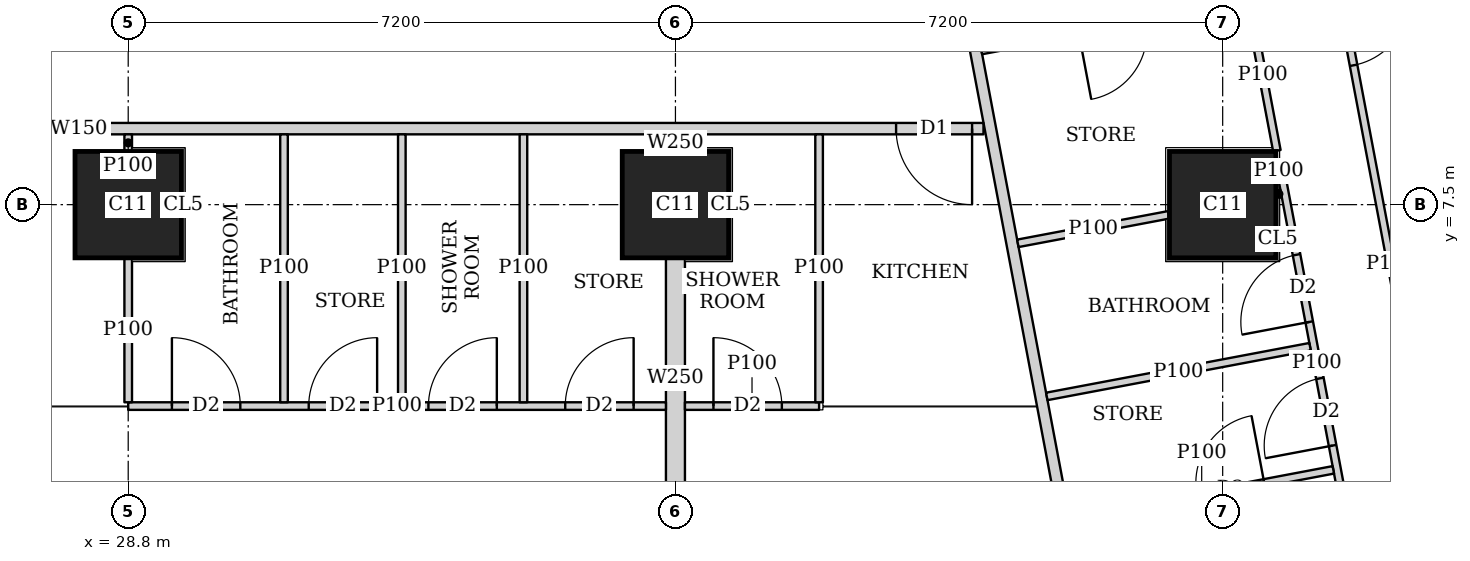
"""IFC4 building model, lengths in metres.
Left out: names, types, materials, properties, quantities, classifications, styles, units other than length and angle.
Written with IfcOpenShell. Run it as: python <this file> out.ifc"""

import sys

from ifc_helpers import new_model, si_unit, direction, frame, frame_2d, origin, origin_2d, place, context, subcontext, project, spatial, rectangle, extrude, element, fill, save


model = new_model("IFC4")
c1 = context("Model", 3, precision=1e-05, world=origin(), true_north=direction((0.0, 1.0)))
c2 = subcontext(c1, "Body", "Model", "MODEL_VIEW")
j1 = project(units=[si_unit("LENGTHUNIT", "METRE"), si_unit("PLANEANGLEUNIT", "RADIAN")], contexts=[c1])
p1 = place(None, origin())
s1 = spatial("IfcSite", under=j1, at=p1, CompositionType="ELEMENT")
p2 = place(p1, origin())
s2 = spatial("IfcBuilding", under=s1, at=p2, CompositionType="ELEMENT")
p3 = place(p2, frame((0.0, 0.0, 227.45)))
s3 = spatial("IfcBuildingStorey", under=s2, at=p3, CompositionType="ELEMENT", Elevation=227.45)
for number, where, z_axis, x_axis in (
    (1, (28.8, 7.5, 0.0), (0.0, 0.0, 1.0), (1.0, 0.0, 0.0)),
    (2, (36.0, 7.5, 0.0), (0.0, 0.0, 1.0), (1.0, 0.0, 0.0)),
    (3, (43.2, 7.5, 0.0), (0.0, 0.0, 1.0), (1.0, 0.0, 0.0)),
):
    element("IfcColumn", number, at=place(p3, frame(where, z_axis=z_axis, x_axis=x_axis)), inside=s3, PredefinedType="COLUMN", context=c2, shape_type="SweptSolid", body=[
        extrude(rectangle(XDim=1.4, YDim=1.4, at=origin_2d()), origin(), (0.0, 0.0, 1.0), 3.75),
    ])
p4 = place(p3, frame((50.653, 2.703, 0.0), z_axis=(0.0, 0.0, 1.0), x_axis=(-0.185612026696, 0.982623109613, 0.0)))
e4 = element("IfcWall", 4, at=p4, inside=s3, PredefinedType="SOLIDWALL", context=c2, shape_type="SweptSolid", body=[
    extrude(rectangle(XDim=41.393, YDim=0.2, at=frame_2d((20.697, 0.0))), origin(), (0.0, 0.0, 1.0), 3.5),
])
p5 = place(p4, frame((1.633, 0.0, 0.9)))
e5 = element("IfcOpeningElement", 5, at=p5, cuts=e4, PredefinedType="OPENING", context=c2, shape_type="SweptSolid", body=[
    extrude(rectangle(XDim=1.8, YDim=1.5, at=frame_2d((0.9, 0.75))), frame((0.0, 0.11, 0.0), z_axis=(0.0, -1.0, 0.0), x_axis=(1.0, 0.0, 0.0)), (0.0, 0.0, 1.0), 0.22),
])
p6 = place(p4, frame((6.032, 0.0, 0.9)))
e6 = element("IfcOpeningElement", 6, at=p6, cuts=e4, PredefinedType="OPENING", context=c2, shape_type="SweptSolid", body=[
    extrude(rectangle(XDim=1.8, YDim=1.5, at=frame_2d((0.9, 0.75))), frame((0.0, 0.11, 0.0), z_axis=(0.0, -1.0, 0.0), x_axis=(1.0, 0.0, 0.0)), (0.0, 0.0, 1.0), 0.22),
])
p7 = place(p4, frame((9.848, 0.0, 0.9)))
e7 = element("IfcOpeningElement", 7, at=p7, cuts=e4, PredefinedType="OPENING", context=c2, shape_type="SweptSolid", body=[
    extrude(rectangle(XDim=1.8, YDim=1.5, at=frame_2d((0.9, 0.75))), frame((0.0, 0.11, 0.0), z_axis=(0.0, -1.0, 0.0), x_axis=(1.0, 0.0, 0.0)), (0.0, 0.0, 1.0), 0.22),
])
p8 = place(p4, frame((13.664, 0.0, 0.9)))
e8 = element("IfcOpeningElement", 8, at=p8, cuts=e4, PredefinedType="OPENING", context=c2, shape_type="SweptSolid", body=[
    extrude(rectangle(XDim=1.8, YDim=1.5, at=frame_2d((0.9, 0.75))), frame((0.0, 0.11, 0.0), z_axis=(0.0, -1.0, 0.0), x_axis=(1.0, 0.0, 0.0)), (0.0, 0.0, 1.0), 0.22),
])
p9 = place(p4, frame((17.481, 0.0, 0.9)))
e9 = element("IfcOpeningElement", 9, at=p9, cuts=e4, PredefinedType="OPENING", context=c2, shape_type="SweptSolid", body=[
    extrude(rectangle(XDim=1.8, YDim=1.5, at=frame_2d((0.9, 0.75))), frame((0.0, 0.11, 0.0), z_axis=(0.0, -1.0, 0.0), x_axis=(1.0, 0.0, 0.0)), (0.0, 0.0, 1.0), 0.22),
])
p10 = place(p4, frame((21.297, 0.0, 0.9)))
e10 = element("IfcOpeningElement", 10, at=p10, cuts=e4, PredefinedType="OPENING", context=c2, shape_type="SweptSolid", body=[
    extrude(rectangle(XDim=1.8, YDim=1.5, at=frame_2d((0.9, 0.75))), frame((0.0, 0.11, 0.0), z_axis=(0.0, -1.0, 0.0), x_axis=(1.0, 0.0, 0.0)), (0.0, 0.0, 1.0), 0.22),
])
p11 = place(p4, frame((25.113, 0.0, 0.9)))
e11 = element("IfcOpeningElement", 11, at=p11, cuts=e4, PredefinedType="OPENING", context=c2, shape_type="SweptSolid", body=[
    extrude(rectangle(XDim=1.8, YDim=1.5, at=frame_2d((0.9, 0.75))), frame((0.0, 0.11, 0.0), z_axis=(0.0, -1.0, 0.0), x_axis=(1.0, 0.0, 0.0)), (0.0, 0.0, 1.0), 0.22),
])
p12 = place(p4, frame((28.93, 0.0, 0.9)))
e12 = element("IfcOpeningElement", 12, at=p12, cuts=e4, PredefinedType="OPENING", context=c2, shape_type="SweptSolid", body=[
    extrude(rectangle(XDim=1.8, YDim=1.5, at=frame_2d((0.9, 0.75))), frame((0.0, 0.11, 0.0), z_axis=(0.0, -1.0, 0.0), x_axis=(1.0, 0.0, 0.0)), (0.0, 0.0, 1.0), 0.22),
])
p13 = place(p4, frame((32.746, 0.0, 0.9)))
e13 = element("IfcOpeningElement", 13, at=p13, cuts=e4, PredefinedType="OPENING", context=c2, shape_type="SweptSolid", body=[
    extrude(rectangle(XDim=1.8, YDim=1.5, at=frame_2d((0.9, 0.75))), frame((0.0, 0.11, 0.0), z_axis=(0.0, -1.0, 0.0), x_axis=(1.0, 0.0, 0.0)), (0.0, 0.0, 1.0), 0.22),
])
p14 = place(p4, frame((36.481, 0.0, 0.9)))
e14 = element("IfcOpeningElement", 14, at=p14, cuts=e4, PredefinedType="OPENING", context=c2, shape_type="SweptSolid", body=[
    extrude(rectangle(XDim=1.8, YDim=1.5, at=frame_2d((0.9, 0.75))), frame((0.0, 0.11, 0.0), z_axis=(0.0, -1.0, 0.0), x_axis=(1.0, 0.0, 0.0)), (0.0, 0.0, 1.0), 0.22),
])
p15 = place(p3, frame((40.053, 8.5, 0.0), z_axis=(0.0, 0.0, 1.0), x_axis=(-1.0, 0.0, 0.0)))
e15 = element("IfcWall", 15, at=p15, inside=s3, PredefinedType="SOLIDWALL", context=c2, shape_type="SweptSolid", body=[
    extrude(rectangle(XDim=23.798, YDim=0.15, at=frame_2d((11.899, 0.0))), origin(), (0.0, 0.0, 1.0), 3.5),
])
p16 = place(p15, frame((21.978, 0.0, 0.0)))
e16 = element("IfcOpeningElement", 16, at=p16, cuts=e15, PredefinedType="OPENING", context=c2, shape_type="SweptSolid", body=[
    extrude(rectangle(XDim=1.0, YDim=2.1, at=frame_2d((0.5, 1.05))), frame((0.0, 0.085, 0.0), z_axis=(0.0, -1.0, 0.0), x_axis=(1.0, 0.0, 0.0)), (0.0, 0.0, 1.0), 0.17),
])
p17 = place(p15, frame((12.753, 0.0, 0.0)))
e17 = element("IfcOpeningElement", 17, at=p17, cuts=e15, PredefinedType="OPENING", context=c2, shape_type="SweptSolid", body=[
    extrude(rectangle(XDim=1.0, YDim=2.1, at=frame_2d((0.5, 1.05))), frame((0.0, 0.085, 0.0), z_axis=(0.0, -1.0, 0.0), x_axis=(1.0, 0.0, 0.0)), (0.0, 0.0, 1.0), 0.17),
])
p18 = place(p15, frame((0.15, 0.0, 0.0)))
e18 = element("IfcOpeningElement", 18, at=p18, cuts=e15, PredefinedType="OPENING", context=c2, shape_type="SweptSolid", body=[
    extrude(rectangle(XDim=1.0, YDim=2.1, at=frame_2d((0.5, 1.05))), frame((0.0, 0.085, 0.0), z_axis=(0.0, -1.0, 0.0), x_axis=(1.0, 0.0, 0.0)), (0.0, 0.0, 1.0), 0.17),
])
p19 = place(p3, frame((33.68, 42.723, 0.0), z_axis=(0.0, 0.0, 1.0), x_axis=(0.185601160014, -0.982625162207, 0.0)))
e19 = element("IfcWall", 19, at=p19, inside=s3, PredefinedType="SOLIDWALL", context=c2, shape_type="SweptSolid", body=[
    extrude(rectangle(XDim=41.051, YDim=0.15, at=frame_2d((20.526, 0.0))), origin(), (0.0, 0.0, 1.0), 2.5),
])
p20 = place(p19, frame((16.123, 0.0, 0.0)))
e20 = element("IfcOpeningElement", 20, at=p20, cuts=e19, PredefinedType="OPENING", context=c2, shape_type="SweptSolid", body=[
    extrude(rectangle(XDim=1.0, YDim=2.1, at=frame_2d((0.5, 1.05))), frame((0.0, 0.085, 0.0), z_axis=(0.0, -1.0, 0.0), x_axis=(1.0, 0.0, 0.0)), (0.0, 0.0, 1.0), 0.17),
])
p21 = place(p19, frame((19.938, 0.0, 0.0)))
e21 = element("IfcOpeningElement", 21, at=p21, cuts=e19, PredefinedType="OPENING", context=c2, shape_type="SweptSolid", body=[
    extrude(rectangle(XDim=1.0, YDim=2.1, at=frame_2d((0.5, 1.05))), frame((0.0, 0.085, 0.0), z_axis=(0.0, -1.0, 0.0), x_axis=(1.0, 0.0, 0.0)), (0.0, 0.0, 1.0), 0.17),
])
p22 = place(p19, frame((30.902, 0.0, 0.0)))
e22 = element("IfcOpeningElement", 22, at=p22, cuts=e19, PredefinedType="OPENING", context=c2, shape_type="SweptSolid", body=[
    extrude(rectangle(XDim=1.0, YDim=2.1, at=frame_2d((0.5, 1.05))), frame((0.0, 0.085, 0.0), z_axis=(0.0, -1.0, 0.0), x_axis=(1.0, 0.0, 0.0)), (0.0, 0.0, 1.0), 0.17),
])
p23 = place(p3, frame((35.875, 4.85, 0.0), z_axis=(0.0, 0.0, 1.0), x_axis=(-1.0, 0.0, 0.0)))
e23 = element("IfcWall", 23, at=p23, inside=s3, PredefinedType="PARTITIONING", context=c2, shape_type="SweptSolid", body=[
    extrude(rectangle(XDim=7.075, YDim=0.1, at=frame_2d((3.538, 0.0))), origin(), (0.0, 0.0, 1.0), 3.5),
])
p24 = place(p23, frame((5.6, 0.0, 0.0)))
e24 = element("IfcOpeningElement", 24, at=p24, cuts=e23, PredefinedType="OPENING", context=c2, shape_type="SweptSolid", body=[
    extrude(rectangle(XDim=0.9, YDim=2.1, at=frame_2d((0.45, 1.05))), frame((0.0, 0.06, 0.0), z_axis=(0.0, -1.0, 0.0), x_axis=(1.0, 0.0, 0.0)), (0.0, 0.0, 1.0), 0.12),
])
p25 = place(p23, frame((2.225, 0.0, 0.0)))
e25 = element("IfcOpeningElement", 25, at=p25, cuts=e23, PredefinedType="OPENING", context=c2, shape_type="SweptSolid", body=[
    extrude(rectangle(XDim=0.9, YDim=2.1, at=frame_2d((0.45, 1.05))), frame((0.0, 0.06, 0.0), z_axis=(0.0, -1.0, 0.0), x_axis=(1.0, 0.0, 0.0)), (0.0, 0.0, 1.0), 0.12),
])
p26 = place(p23, frame((3.8, 0.0, 0.0)))
e26 = element("IfcOpeningElement", 26, at=p26, cuts=e23, PredefinedType="OPENING", context=c2, shape_type="SweptSolid", body=[
    extrude(rectangle(XDim=0.9, YDim=2.1, at=frame_2d((0.45, 1.05))), frame((0.0, 0.06, 0.0), z_axis=(0.0, -1.0, 0.0), x_axis=(1.0, 0.0, 0.0)), (0.0, 0.0, 1.0), 0.12),
])
p27 = place(p23, frame((0.425, 0.0, 0.0)))
e27 = element("IfcOpeningElement", 27, at=p27, cuts=e23, PredefinedType="OPENING", context=c2, shape_type="SweptSolid", body=[
    extrude(rectangle(XDim=0.9, YDim=2.1, at=frame_2d((0.45, 1.05))), frame((0.0, 0.06, 0.0), z_axis=(0.0, -1.0, 0.0), x_axis=(1.0, 0.0, 0.0)), (0.0, 0.0, 1.0), 0.12),
])
p28 = place(p3, frame((28.8, 4.9, 0.0), z_axis=(0.0, 0.0, 1.0), x_axis=(0.0, 1.0, 0.0)))
e28 = element("IfcWall", 28, at=p28, inside=s3, PredefinedType="PARTITIONING", context=c2, shape_type="SweptSolid", body=[
    extrude(rectangle(XDim=1.899, YDim=0.1, at=frame_2d((0.95, 0.0))), origin(), (0.0, 0.0, 1.0), 3.5),
])
p29 = place(p3, frame((28.8, 8.201, 0.0), z_axis=(0.0, 0.0, 1.0), x_axis=(0.0, 1.0, 0.0)))
e29 = element("IfcWall", 29, at=p29, inside=s3, PredefinedType="PARTITIONING", context=c2, shape_type="SweptSolid", body=[
    extrude(rectangle(XDim=0.224, YDim=0.1, at=frame_2d((0.112, 0.0))), origin(), (0.0, 0.0, 1.0), 3.5),
])
for number, where, z_axis, x_axis in (
    (30, (32.4, 4.9, 0.0), (0.0, 0.0, 1.0), (0.0, 1.0, 0.0)),
    (31, (30.85, 4.9, 0.0), (0.0, 0.0, 1.0), (0.0, 1.0, 0.0)),
    (32, (34.0, 4.9, 0.0), (0.0, 0.0, 1.0), (0.0, 1.0, 0.0)),
):
    element("IfcWall", number, at=place(p3, frame(where, z_axis=z_axis, x_axis=x_axis)), inside=s3, PredefinedType="PARTITIONING", context=c2, shape_type="SweptSolid", body=[
        extrude(rectangle(XDim=3.525, YDim=0.1, at=frame_2d((1.763, 0.0))), origin(), (0.0, 0.0, 1.0), 3.5),
    ])
p30 = place(p3, frame((37.89, 4.85, 0.0), z_axis=(0.0, 0.0, 1.0), x_axis=(-1.0, 0.0, 0.0)))
e33 = element("IfcWall", 33, at=p30, inside=s3, PredefinedType="PARTITIONING", context=c2, shape_type="SweptSolid", body=[
    extrude(rectangle(XDim=1.765, YDim=0.1, at=frame_2d((0.882, 0.0))), origin(), (0.0, 0.0, 1.0), 3.5),
])
p31 = place(p30, frame((0.49, 0.0, 0.0)))
e34 = element("IfcOpeningElement", 34, at=p31, cuts=e33, PredefinedType="OPENING", context=c2, shape_type="SweptSolid", body=[
    extrude(rectangle(XDim=0.9, YDim=2.1, at=frame_2d((0.45, 1.05))), frame((0.0, 0.06, 0.0), z_axis=(0.0, -1.0, 0.0), x_axis=(1.0, 0.0, 0.0)), (0.0, 0.0, 1.0), 0.12),
])
p32 = place(p3, frame((37.89, 4.9, 0.0), z_axis=(0.0, 0.0, 1.0), x_axis=(0.0, 1.0, 0.0)))
e35 = element("IfcWall", 35, at=p32, inside=s3, PredefinedType="PARTITIONING", context=c2, shape_type="SweptSolid", body=[
    extrude(rectangle(XDim=3.525, YDim=0.1, at=frame_2d((1.763, 0.0))), origin(), (0.0, 0.0, 1.0), 3.5),
])
p33 = place(p3, frame((36.0, 3.65, 0.0), z_axis=(0.0, 0.0, 1.0), x_axis=(0.0, 1.0, 0.0)))
e36 = element("IfcWall", 36, at=p33, inside=s3, PredefinedType="SOLIDWALL", context=c2, shape_type="SweptSolid", body=[
    extrude(rectangle(XDim=3.149, YDim=0.25, at=frame_2d((1.575, 0.0))), origin(), (0.0, 0.0, 1.0), 3.5),
])
p34 = place(p3, frame((36.0, 8.201, 0.0), z_axis=(0.0, 0.0, 1.0), x_axis=(0.0, 1.0, 0.0)))
e37 = element("IfcWall", 37, at=p34, inside=s3, PredefinedType="SOLIDWALL", context=c2, shape_type="SweptSolid", body=[
    extrude(rectangle(XDim=0.224, YDim=0.25, at=frame_2d((0.112, 0.0))), origin(), (0.0, 0.0, 1.0), 3.5),
])
p35 = place(p3, frame((44.727, 10.366, 0.0), z_axis=(0.0, 0.0, 1.0), x_axis=(0.185678775129, -0.982610498858, 0.0)))
e38 = element("IfcWall", 38, at=p35, inside=s3, PredefinedType="PARTITIONING", context=c2, shape_type="SweptSolid", body=[
    extrude(rectangle(XDim=7.421, YDim=0.1, at=frame_2d((3.71, 0.0))), origin(), (0.0, 0.0, 1.0), 3.5),
])
p36 = place(p35, frame((0.151, 0.0, 0.0)))
e39 = element("IfcOpeningElement", 39, at=p36, cuts=e38, PredefinedType="OPENING", context=c2, shape_type="SweptSolid", body=[
    extrude(rectangle(XDim=0.9, YDim=2.1, at=frame_2d((0.45, 1.05))), frame((0.0, 0.06, 0.0), z_axis=(0.0, -1.0, 0.0), x_axis=(1.0, 0.0, 0.0)), (0.0, 0.0, 1.0), 0.12),
])
p37 = place(p35, frame((4.65, 0.0, 0.0)))
e40 = element("IfcOpeningElement", 40, at=p37, cuts=e38, PredefinedType="OPENING", context=c2, shape_type="SweptSolid", body=[
    extrude(rectangle(XDim=0.9, YDim=2.1, at=frame_2d((0.45, 1.05))), frame((0.0, 0.06, 0.0), z_axis=(0.0, -1.0, 0.0), x_axis=(1.0, 0.0, 0.0)), (0.0, 0.0, 1.0), 0.12),
])
p38 = place(p3, frame((43.539, 10.192, 0.0), z_axis=(0.0, 0.0, 1.0), x_axis=(0.185443145218, -0.982654995353, 0.0)))
e41 = element("IfcWall", 41, at=p38, inside=s3, PredefinedType="PARTITIONING", context=c2, shape_type="SweptSolid", body=[
    extrude(rectangle(XDim=2.017, YDim=0.1, at=frame_2d((1.008, 0.0))), origin(), (0.0, 0.0, 1.0), 3.5),
])
p39 = place(p3, frame((43.949, 8.02, 0.0), z_axis=(0.0, 0.0, 1.0), x_axis=(0.185656792073, -0.982614652627, 0.0)))
e42 = element("IfcWall", 42, at=p39, inside=s3, PredefinedType="PARTITIONING", context=c2, shape_type="SweptSolid", body=[
    extrude(rectangle(XDim=5.289, YDim=0.1, at=frame_2d((2.645, 0.0))), origin(), (0.0, 0.0, 1.0), 3.5),
])
p40 = place(p39, frame((1.2, 0.0, 0.0)))
e43 = element("IfcOpeningElement", 43, at=p40, cuts=e42, PredefinedType="OPENING", context=c2, shape_type="SweptSolid", body=[
    extrude(rectangle(XDim=0.9, YDim=2.1, at=frame_2d((0.45, 1.05))), frame((0.0, 0.06, 0.0), z_axis=(0.0, -1.0, 0.0), x_axis=(1.0, 0.0, 0.0)), (0.0, 0.0, 1.0), 0.12),
])
p41 = place(p39, frame((2.855, 0.0, 0.0)))
e44 = element("IfcOpeningElement", 44, at=p41, cuts=e42, PredefinedType="OPENING", context=c2, shape_type="SweptSolid", body=[
    extrude(rectangle(XDim=0.9, YDim=2.1, at=frame_2d((0.45, 1.05))), frame((0.0, 0.06, 0.0), z_axis=(0.0, -1.0, 0.0), x_axis=(1.0, 0.0, 0.0)), (0.0, 0.0, 1.0), 0.12),
])
p42 = place(p3, frame((43.49, 10.183, 0.0), z_axis=(0.0, 0.0, 1.0), x_axis=(-0.982588017646, -0.185797706064, 0.0)))
e45 = element("IfcWall", 45, at=p42, inside=s3, PredefinedType="PARTITIONING", context=c2, shape_type="SweptSolid", body=[
    extrude(rectangle(XDim=3.525, YDim=0.1, at=frame_2d((1.763, 0.0))), origin(), (0.0, 0.0, 1.0), 3.5),
])
p43 = place(p42, frame((1.325, 0.0, 0.0)))
e46 = element("IfcOpeningElement", 46, at=p43, cuts=e45, PredefinedType="OPENING", context=c2, shape_type="SweptSolid", body=[
    extrude(rectangle(XDim=0.9, YDim=2.1, at=frame_2d((0.45, 1.05))), frame((0.0, 0.06, 0.0), z_axis=(0.0, -1.0, 0.0), x_axis=(1.0, 0.0, 0.0)), (0.0, 0.0, 1.0), 0.12),
])
p44 = place(p3, frame((43.969, 7.646, 0.0), z_axis=(0.0, 0.0, 1.0), x_axis=(-0.983147034646, -0.182816597351, 0.0)))
e47 = element("IfcWall", 47, at=p44, inside=s3, PredefinedType="PARTITIONING", context=c2, shape_type="SweptSolid", body=[
    extrude(rectangle(XDim=0.06, YDim=0.1, at=frame_2d((0.03, 0.0))), origin(), (0.0, 0.0, 1.0), 3.5),
])
p45 = place(p3, frame((42.49, 7.366, 0.0), z_axis=(0.0, 0.0, 1.0), x_axis=(-0.982620917875, -0.185623629302, 0.0)))
e48 = element("IfcWall", 48, at=p45, inside=s3, PredefinedType="PARTITIONING", context=c2, shape_type="SweptSolid", body=[
    extrude(rectangle(XDim=2.02, YDim=0.1, at=frame_2d((1.01, 0.0))), origin(), (0.0, 0.0, 1.0), 3.5),
])
p46 = place(p3, frame((44.35, 5.631, 0.0), z_axis=(0.0, 0.0, 1.0), x_axis=(-0.982638553676, -0.185530247748, 0.0)))
e49 = element("IfcWall", 49, at=p46, inside=s3, PredefinedType="PARTITIONING", context=c2, shape_type="SweptSolid", body=[
    extrude(rectangle(XDim=3.525, YDim=0.1, at=frame_2d((1.763, 0.0))), origin(), (0.0, 0.0, 1.0), 3.5),
])
p47 = place(p3, frame((41.192, 3.356, 0.0), z_axis=(0.0, 0.0, 1.0), x_axis=(0.982588017646, 0.185797706064, 0.0)))
e50 = element("IfcWall", 50, at=p47, inside=s3, PredefinedType="PARTITIONING", context=c2, shape_type="SweptSolid", body=[
    extrude(rectangle(XDim=3.525, YDim=0.1, at=frame_2d((1.763, 0.0))), origin(), (0.0, 0.0, 1.0), 3.5),
])
p48 = place(p47, frame((1.7, 0.0, 0.0)))
e51 = element("IfcOpeningElement", 51, at=p48, cuts=e50, PredefinedType="OPENING", context=c2, shape_type="SweptSolid", body=[
    extrude(rectangle(XDim=0.9, YDim=2.1, at=frame_2d((0.45, 1.05))), frame((0.0, 0.06, 0.0), z_axis=(0.0, -1.0, 0.0), x_axis=(1.0, 0.0, 0.0)), (0.0, 0.0, 1.0), 0.12),
])
p49 = place(p24, origin())
e52 = element("IfcDoor", 52, at=p49, inside=s3, OperationType="SINGLE_SWING_LEFT", PredefinedType="DOOR", context=c2, shape_type="SweptSolid", body=[
    extrude(rectangle(XDim=0.9, YDim=2.1, at=frame_2d((0.45, 1.05))), frame((0.0, 0.025, 0.0), z_axis=(0.0, -1.0, 0.0), x_axis=(1.0, 0.0, 0.0)), (0.0, 0.0, 1.0), 0.05),
])
fill(e24, e52)
p50 = place(p25, origin())
e53 = element("IfcDoor", 53, at=p50, inside=s3, OperationType="SINGLE_SWING_RIGHT", PredefinedType="DOOR", context=c2, shape_type="SweptSolid", body=[
    extrude(rectangle(XDim=0.9, YDim=2.1, at=frame_2d((0.45, 1.05))), frame((0.0, 0.025, 0.0), z_axis=(0.0, -1.0, 0.0), x_axis=(1.0, 0.0, 0.0)), (0.0, 0.0, 1.0), 0.05),
])
fill(e25, e53)
p51 = place(p26, origin())
e54 = element("IfcDoor", 54, at=p51, inside=s3, OperationType="SINGLE_SWING_RIGHT", PredefinedType="DOOR", context=c2, shape_type="SweptSolid", body=[
    extrude(rectangle(XDim=0.9, YDim=2.1, at=frame_2d((0.45, 1.05))), frame((0.0, 0.025, 0.0), z_axis=(0.0, -1.0, 0.0), x_axis=(1.0, 0.0, 0.0)), (0.0, 0.0, 1.0), 0.05),
])
fill(e26, e54)
p52 = place(p27, origin())
e55 = element("IfcDoor", 55, at=p52, inside=s3, OperationType="SINGLE_SWING_RIGHT", PredefinedType="DOOR", context=c2, shape_type="SweptSolid", body=[
    extrude(rectangle(XDim=0.9, YDim=2.1, at=frame_2d((0.45, 1.05))), frame((0.0, 0.025, 0.0), z_axis=(0.0, -1.0, 0.0), x_axis=(1.0, 0.0, 0.0)), (0.0, 0.0, 1.0), 0.05),
])
fill(e27, e55)
p53 = place(p31, origin())
e56 = element("IfcDoor", 56, at=p53, inside=s3, OperationType="SINGLE_SWING_LEFT", PredefinedType="DOOR", context=c2, shape_type="SweptSolid", body=[
    extrude(rectangle(XDim=0.9, YDim=2.1, at=frame_2d((0.45, 1.05))), frame((0.0, 0.025, 0.0), z_axis=(0.0, -1.0, 0.0), x_axis=(1.0, 0.0, 0.0)), (0.0, 0.0, 1.0), 0.05),
])
fill(e34, e56)
p54 = place(p18, origin())
e57 = element("IfcDoor", 57, at=p54, inside=s3, OperationType="SINGLE_SWING_LEFT", PredefinedType="DOOR", context=c2, shape_type="SweptSolid", body=[
    extrude(rectangle(XDim=1.0, YDim=2.1, at=frame_2d((0.5, 1.05))), frame((0.0, 0.025, 0.0), z_axis=(0.0, -1.0, 0.0), x_axis=(1.0, 0.0, 0.0)), (0.0, 0.0, 1.0), 0.05),
])
fill(e18, e57)
p55 = place(p36, origin())
e58 = element("IfcDoor", 58, at=p55, inside=s3, OperationType="SINGLE_SWING_LEFT", PredefinedType="DOOR", context=c2, shape_type="SweptSolid", body=[
    extrude(rectangle(XDim=0.9, YDim=2.1, at=frame_2d((0.45, 1.05))), frame((0.0, 0.025, 0.0), z_axis=(0.0, -1.0, 0.0), x_axis=(1.0, 0.0, 0.0)), (0.0, 0.0, 1.0), 0.05),
])
fill(e39, e58)
p56 = place(p40, origin())
e59 = element("IfcDoor", 59, at=p56, inside=s3, OperationType="SINGLE_SWING_LEFT", PredefinedType="DOOR", context=c2, shape_type="SweptSolid", body=[
    extrude(rectangle(XDim=0.9, YDim=2.1, at=frame_2d((0.45, 1.05))), frame((0.0, 0.025, 0.0), z_axis=(0.0, -1.0, 0.0), x_axis=(1.0, 0.0, 0.0)), (0.0, 0.0, 1.0), 0.05),
])
fill(e43, e59)
p57 = place(p41, origin())
e60 = element("IfcDoor", 60, at=p57, inside=s3, OperationType="SINGLE_SWING_LEFT", PredefinedType="DOOR", context=c2, shape_type="SweptSolid", body=[
    extrude(rectangle(XDim=0.9, YDim=2.1, at=frame_2d((0.45, 1.05))), frame((0.0, 0.025, 0.0), z_axis=(0.0, -1.0, 0.0), x_axis=(1.0, 0.0, 0.0)), (0.0, 0.0, 1.0), 0.05),
])
fill(e44, e60)
p58 = place(p48, origin())
e61 = element("IfcDoor", 61, at=p58, inside=s3, OperationType="SINGLE_SWING_RIGHT", PredefinedType="DOOR", context=c2, shape_type="SweptSolid", body=[
    extrude(rectangle(XDim=0.9, YDim=2.1, at=frame_2d((0.45, 1.05))), frame((0.0, 0.025, 0.0), z_axis=(0.0, -1.0, 0.0), x_axis=(1.0, 0.0, 0.0)), (0.0, 0.0, 1.0), 0.05),
])
fill(e51, e61)
save(model, sys.argv[1])
